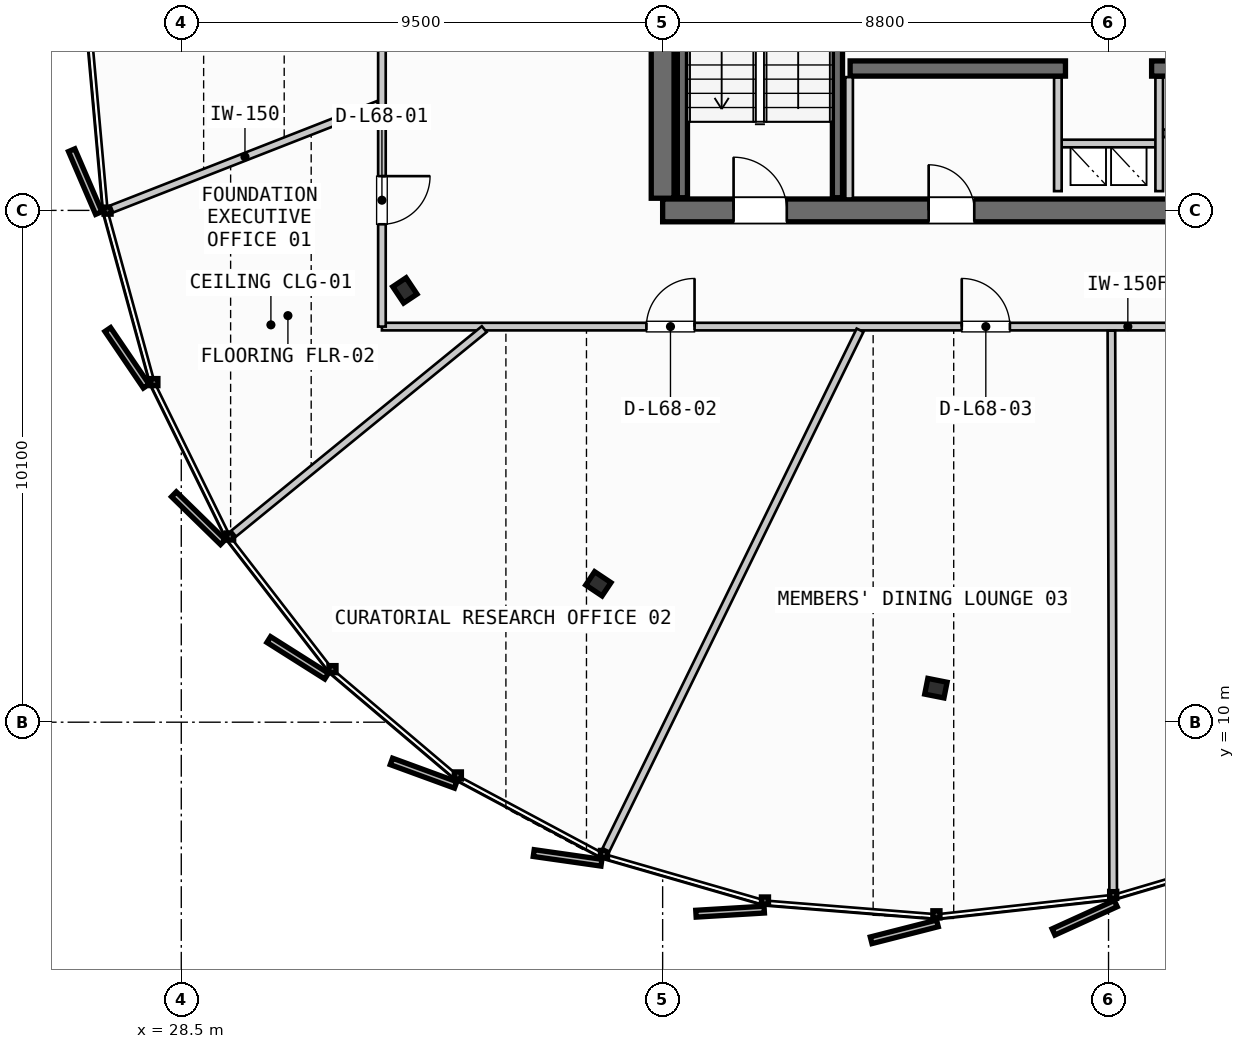
"""IFC4 building model, lengths in metres.
Left out: names, types, materials, properties, quantities, classifications, styles, units other than length and angle.
Written with IfcOpenShell. Run it as: python <this file> out.ifc"""

import sys

from ifc_helpers import new_model, si_unit, direction, frame, frame_2d, origin, origin_2d, place, context, subcontext, project, spatial, rectangle, i_section, extrude, source, transform, mapped, element, fill, save


model = new_model("IFC4")
c1 = context("Model", 3, precision=1e-05, world=origin(), true_north=direction((0.0, 1.0)))
c2 = subcontext(c1, "Body", "Model", "MODEL_VIEW")
j1 = project(units=[si_unit("LENGTHUNIT", "METRE"), si_unit("PLANEANGLEUNIT", "RADIAN")], contexts=[c1])
p1 = place(None, origin())
s1 = spatial("IfcSite", under=j1, at=p1, CompositionType="ELEMENT")
p2 = place(p1, origin())
s2 = spatial("IfcBuilding", under=s1, at=p2, CompositionType="ELEMENT")
p3 = place(p2, frame((0.0, 0.0, 259.45)))
s3 = spatial("IfcBuildingStorey", under=s2, at=p3, CompositionType="ELEMENT", Elevation=259.45)
p4 = place(p3, frame((38.0, 20.1, 0.0), z_axis=(0.0, 0.0, 1.0), x_axis=(1.0, 0.0, 0.0)))
e1 = element("IfcWall", 1, at=p4, inside=s3, PredefinedType="SHEAR", context=c2, shape_type="SweptSolid", body=[
    extrude(rectangle(XDim=17.6, YDim=0.45, at=frame_2d((8.8, 0.0))), origin(), (0.0, 0.0, 1.0), 3.21),
])
p5 = place(p4, frame((1.4, 0.0, 0.0)))
e2 = element("IfcOpeningElement", 2, at=p5, cuts=e1, PredefinedType="OPENING", context=c2, shape_type="SweptSolid", body=[
    extrude(rectangle(XDim=1.05, YDim=2.15, at=frame_2d((0.525, 1.075))), frame((0.0, 0.235, 0.0), z_axis=(0.0, -1.0, 0.0), x_axis=(1.0, 0.0, 0.0)), (0.0, 0.0, 1.0), 0.47),
])
p6 = place(p4, frame((15.15, 0.0, 0.0)))
e3 = element("IfcOpeningElement", 3, at=p6, cuts=e1, PredefinedType="OPENING", context=c2, shape_type="SweptSolid", body=[
    extrude(rectangle(XDim=1.05, YDim=2.15, at=frame_2d((0.525, 1.075))), frame((0.0, 0.235, 0.0), z_axis=(0.0, -1.0, 0.0), x_axis=(1.0, 0.0, 0.0)), (0.0, 0.0, 1.0), 0.47),
])
p7 = place(p4, frame((5.25, 0.0, 0.0)))
e4 = element("IfcOpeningElement", 4, at=p7, cuts=e1, PredefinedType="OPENING", context=c2, shape_type="SweptSolid", body=[
    extrude(rectangle(XDim=0.9, YDim=2.15, at=frame_2d((0.45, 1.075))), frame((0.0, 0.235, 0.0), z_axis=(0.0, -1.0, 0.0), x_axis=(1.0, 0.0, 0.0)), (0.0, 0.0, 1.0), 0.47),
])
p8 = place(p4, frame((11.4, 0.0, 0.0)))
e5 = element("IfcOpeningElement", 5, at=p8, cuts=e1, PredefinedType="OPENING", context=c2, shape_type="SweptSolid", body=[
    extrude(rectangle(XDim=0.95, YDim=2.15, at=frame_2d((0.475, 1.075))), frame((0.0, 0.235, 0.0), z_axis=(0.0, -1.0, 0.0), x_axis=(1.0, 0.0, 0.0)), (0.0, 0.0, 1.0), 0.47),
])
p9 = place(p3, frame((38.0, 35.26, 0.0), z_axis=(0.0, 0.0, 1.0), x_axis=(0.0, -1.0, 0.0)))
e6 = element("IfcWall", 6, at=p9, inside=s3, PredefinedType="SHEAR", context=c2, shape_type="SweptSolid", body=[
    extrude(rectangle(XDim=14.92, YDim=0.45, at=frame_2d((7.46, 0.0))), origin(), (0.0, 0.0, 1.0), 3.21),
])
p10 = place(p9, frame((5.21, 0.0, 0.0)))
e7 = element("IfcOpeningElement", 7, at=p10, cuts=e6, PredefinedType="OPENING", context=c2, shape_type="SweptSolid", body=[
    extrude(rectangle(XDim=1.1, YDim=2.2, at=frame_2d((0.55, 1.1))), frame((0.0, 0.235, 0.0), z_axis=(0.0, -1.0, 0.0), x_axis=(1.0, 0.0, 0.0)), (0.0, 0.0, 1.0), 0.47),
])
for number, where, z_axis, x_axis in (
    (8, (41.7, 22.9, 0.0), (0.0, 0.0, 1.0), (1.0, 0.0, 0.0)),
    (9, (47.65, 22.9, 0.0), (0.0, 0.0, 1.0), (1.0, 0.0, 0.0)),
):
    element("IfcWall", number, at=place(p3, frame(where, z_axis=z_axis, x_axis=x_axis)), inside=s3, PredefinedType="SHEAR", context=c2, shape_type="SweptSolid", body=[
        extrude(rectangle(XDim=4.25, YDim=0.3, at=frame_2d((2.125, 0.0))), origin(), (0.0, 0.0, 1.0), 3.21),
    ])
m1 = source(origin(), c2, "Body", "SweptSolid", [
    extrude(i_section(OverallWidth=0.387, OverallDepth=0.316, WebThickness=0.019, FlangeThickness=0.028, FilletRadius=0.015, at=origin_2d()), origin(), (0.0, 0.0, 1.0), 3.21),
])
for number, where, z_axis, x_axis in (
    (10, (32.913, 18.521, 0.0), (0.0, 0.0, 1.0), (-0.831, -0.556, 0.0)),
    (11, (36.731, 12.731, 0.0), (0.0, 0.0, 1.0), (-0.556, -0.831, 0.0)),
    (12, (43.393, 10.671, 0.0), (0.0, 0.0, 1.0), (-0.195, -0.981, 0.0)),
):
    element("IfcColumn", number, at=place(p3, frame(where, z_axis=z_axis, x_axis=x_axis)), inside=s3, PredefinedType="COLUMN", context=c2, shape_type="MappedRepresentation", body=[
        mapped(m1, transform((0.0, 0.0, 0.0), scale=1.0)),
    ])
for number, where, z_axis, x_axis in (
    (13, (41.45, 27.7, 0.0), (0.0, 0.0, 1.0), (0.0, -1.0, 0.0)),
    (14, (38.39, 20.35, 0.0), (0.0, 0.0, 1.0), (0.0, 1.0, 0.0)),
):
    element("IfcWall", number, at=place(p3, frame(where, z_axis=z_axis, x_axis=x_axis)), inside=s3, PredefinedType="SHEAR", context=c2, shape_type="SweptSolid", body=[
        extrude(rectangle(XDim=7.35, YDim=0.2, at=frame_2d((3.675, 0.0))), origin(), (0.0, 0.0, 1.0), 3.21),
    ])
p11 = place(p3, frame((45.8, 21.42, 0.0), z_axis=(0.0, 0.0, 1.0), x_axis=(1.0, 0.0, 0.0)))
e15 = element("IfcWall", 15, at=p11, inside=s3, PredefinedType="PARTITIONING", context=c2, shape_type="SweptSolid", body=[
    extrude(rectangle(XDim=2.0, YDim=0.15, at=frame_2d((1.0, 0.0))), origin(), (0.0, 0.0, 1.0), 2.735),
])
for number, where, z_axis, x_axis in (
    (16, (45.8, 20.48, 0.0), (0.0, 0.0, 1.0), (0.0, 1.0, 0.0)),
    (17, (47.8, 20.48, 0.0), (0.0, 0.0, 1.0), (0.0, 1.0, 0.0)),
):
    element("IfcWall", number, at=place(p3, frame(where, z_axis=z_axis, x_axis=x_axis)), inside=s3, PredefinedType="PARTITIONING", context=c2, shape_type="SweptSolid", body=[
        extrude(rectangle(XDim=2.24, YDim=0.15, at=frame_2d((1.12, 0.0))), origin(), (0.0, 0.0, 1.0), 2.735),
    ])
p12 = place(p3, frame((41.68, 20.335, 0.0), z_axis=(0.0, 0.0, 1.0), x_axis=(0.0, 1.0, 0.0)))
e18 = element("IfcWall", 18, at=p12, inside=s3, PredefinedType="PARTITIONING", context=c2, shape_type="SweptSolid", body=[
    extrude(rectangle(XDim=2.395, YDim=0.15, at=frame_2d((1.198, 0.0))), origin(), (0.0, 0.0, 1.0), 2.735),
])
p13 = place(p3, frame((47.88, 21.62, 0.0), z_axis=(0.0, 0.0, 1.0), x_axis=(1.0, 0.0, 0.0)))
e19 = element("IfcWall", 19, at=p13, inside=s3, PredefinedType="PARTITIONING", context=c2, shape_type="SweptSolid", body=[
    extrude(rectangle(XDim=3.96, YDim=0.15, at=frame_2d((1.98, 0.0))), origin(), (0.0, 0.0, 1.0), 2.735),
])
p14 = place(p13, frame((1.55, 0.0, 0.0)))
e20 = element("IfcOpeningElement", 20, at=p14, cuts=e19, PredefinedType="OPENING", context=c2, shape_type="SweptSolid", body=[
    extrude(rectangle(XDim=0.85, YDim=2.15, at=frame_2d((0.425, 1.075))), frame((0.0, 0.085, 0.0), z_axis=(0.0, -1.0, 0.0), x_axis=(1.0, 0.0, 0.0)), (0.0, 0.0, 1.0), 0.17),
])
p15 = place(p3, frame((32.46, 17.807, 0.0), z_axis=(0.0, 0.0, 1.0), x_axis=(1.0, 0.0, 0.0)))
e21 = element("IfcWall", 21, at=p15, inside=s3, PredefinedType="PARTITIONING", context=c2, shape_type="SweptSolid", body=[
    extrude(rectangle(XDim=29.442, YDim=0.15, at=frame_2d((14.721, 0.0))), origin(), (0.0, 0.0, 1.0), 2.735),
])
p16 = place(p15, frame((5.22, 0.0, 0.0)))
e22 = element("IfcOpeningElement", 22, at=p16, cuts=e21, PredefinedType="OPENING", context=c2, shape_type="SweptSolid", body=[
    extrude(rectangle(XDim=0.95, YDim=2.15, at=frame_2d((0.475, 1.075))), frame((0.0, 0.085, 0.0), z_axis=(0.0, -1.0, 0.0), x_axis=(1.0, 0.0, 0.0)), (0.0, 0.0, 1.0), 0.17),
])
p17 = place(p15, frame((11.443, 0.0, 0.0)))
e23 = element("IfcOpeningElement", 23, at=p17, cuts=e21, PredefinedType="OPENING", context=c2, shape_type="SweptSolid", body=[
    extrude(rectangle(XDim=0.95, YDim=2.15, at=frame_2d((0.475, 1.075))), frame((0.0, 0.085, 0.0), z_axis=(0.0, -1.0, 0.0), x_axis=(1.0, 0.0, 0.0)), (0.0, 0.0, 1.0), 0.17),
])
p18 = place(p15, frame((21.154, 0.0, 0.0)))
e24 = element("IfcOpeningElement", 24, at=p18, cuts=e21, PredefinedType="OPENING", context=c2, shape_type="SweptSolid", body=[
    extrude(rectangle(XDim=0.95, YDim=2.15, at=frame_2d((0.475, 1.075))), frame((0.0, 0.085, 0.0), z_axis=(0.0, -1.0, 0.0), x_axis=(1.0, 0.0, 0.0)), (0.0, 0.0, 1.0), 0.17),
])
p19 = place(p3, frame((32.46, 37.331, 0.0), z_axis=(0.0, 0.0, 1.0), x_axis=(0.0, -1.0, 0.0)))
e25 = element("IfcWall", 25, at=p19, inside=s3, PredefinedType="PARTITIONING", context=c2, shape_type="SweptSolid", body=[
    extrude(rectangle(XDim=19.524, YDim=0.15, at=frame_2d((9.762, 0.0))), origin(), (0.0, 0.0, 1.0), 2.735),
])
p20 = place(p19, frame((16.555, 0.0, 0.0)))
e26 = element("IfcOpeningElement", 26, at=p20, cuts=e25, PredefinedType="OPENING", context=c2, shape_type="SweptSolid", body=[
    extrude(rectangle(XDim=0.95, YDim=2.15, at=frame_2d((0.475, 1.075))), frame((0.0, 0.085, 0.0), z_axis=(0.0, -1.0, 0.0), x_axis=(1.0, 0.0, 0.0)), (0.0, 0.0, 1.0), 0.17),
])
p21 = place(p19, frame((8.942, 0.0, 0.0)))
e27 = element("IfcOpeningElement", 27, at=p21, cuts=e25, PredefinedType="OPENING", context=c2, shape_type="SweptSolid", body=[
    extrude(rectangle(XDim=0.95, YDim=2.15, at=frame_2d((0.475, 1.075))), frame((0.0, 0.085, 0.0), z_axis=(0.0, -1.0, 0.0), x_axis=(1.0, 0.0, 0.0)), (0.0, 0.0, 1.0), 0.17),
])
p22 = place(p3, frame((32.385, 22.187, 0.0), z_axis=(0.0, 0.0, 1.0), x_axis=(-0.931177682832, -0.36456566349, 0.0)))
e28 = element("IfcWall", 28, at=p22, inside=s3, PredefinedType="PARTITIONING", context=c2, shape_type="SweptSolid", body=[
    extrude(rectangle(XDim=5.645, YDim=0.15, at=frame_2d((2.823, 0.0))), origin(), (0.0, 0.0, 1.0), 2.735),
])
p23 = place(p3, frame((34.479, 17.756, 0.0), z_axis=(0.0, 0.0, 1.0), x_axis=(-0.77484776556, -0.632147878433, 0.0)))
e29 = element("IfcWall", 29, at=p23, inside=s3, PredefinedType="PARTITIONING", context=c2, shape_type="SweptSolid", body=[
    extrude(rectangle(XDim=6.383, YDim=0.15, at=frame_2d((3.192, 0.0))), origin(), (0.0, 0.0, 1.0), 2.735),
])
p24 = place(p3, frame((41.896, 17.735, 0.0), z_axis=(0.0, 0.0, 1.0), x_axis=(-0.439308331491, -0.898336345632, 0.0)))
e30 = element("IfcWall", 30, at=p24, inside=s3, PredefinedType="PARTITIONING", context=c2, shape_type="SweptSolid", body=[
    extrude(rectangle(XDim=11.415, YDim=0.15, at=frame_2d((5.708, 0.0))), origin(), (0.0, 0.0, 1.0), 2.735),
])
p25 = place(p3, frame((46.857, 17.727, 0.0), z_axis=(0.0, 0.0, 1.0), x_axis=(0.00316097362, -0.99999500411, 0.0)))
e31 = element("IfcWall", 31, at=p25, inside=s3, PredefinedType="PARTITIONING", context=c2, shape_type="SweptSolid", body=[
    extrude(rectangle(XDim=11.045, YDim=0.15, at=frame_2d((5.522, 0.0))), origin(), (0.0, 0.0, 1.0), 2.735),
])
m2 = source(origin(), c2, "Body", "SweptSolid", [
    extrude(rectangle(XDim=1.05, YDim=2.15, at=frame_2d((0.525, 1.075))), frame((0.0, 0.025, 0.0), z_axis=(0.0, -1.0, 0.0), x_axis=(1.0, 0.0, 0.0)), (0.0, 0.0, 1.0), 0.05),
])
p26 = place(p5, origin())
e32 = element("IfcDoor", 32, at=p26, inside=s3, OperationType="SINGLE_SWING_LEFT", PredefinedType="DOOR", context=c2, shape_type="MappedRepresentation", body=[
    mapped(m2, transform((0.0, 0.0, 0.0), scale=1.0)),
])
fill(e2, e32)
m3 = source(origin(), c2, "Body", "SweptSolid", [
    extrude(rectangle(XDim=0.9, YDim=2.15, at=frame_2d((0.45, 1.075))), frame((0.0, 0.025, 0.0), z_axis=(0.0, -1.0, 0.0), x_axis=(1.0, 0.0, 0.0)), (0.0, 0.0, 1.0), 0.05),
])
p27 = place(p7, origin())
e33 = element("IfcDoor", 33, at=p27, inside=s3, OperationType="SINGLE_SWING_LEFT", PredefinedType="DOOR", context=c2, shape_type="MappedRepresentation", body=[
    mapped(m3, transform((0.0, 0.0, 0.0), scale=1.0)),
])
fill(e4, e33)
m4 = source(origin(), c2, "Body", "SweptSolid", [
    extrude(rectangle(XDim=0.95, YDim=2.15, at=frame_2d((0.475, 1.075))), frame((0.0, 0.025, 0.0), z_axis=(0.0, -1.0, 0.0), x_axis=(1.0, 0.0, 0.0)), (0.0, 0.0, 1.0), 0.05),
])
p28 = place(p16, origin())
e34 = element("IfcDoor", 34, at=p28, inside=s3, OperationType="SINGLE_SWING_RIGHT", PredefinedType="DOOR", context=c2, shape_type="MappedRepresentation", body=[
    mapped(m4, transform((0.0, 0.0, 0.0), scale=1.0)),
])
fill(e22, e34)
p29 = place(p17, origin())
e35 = element("IfcDoor", 35, at=p29, inside=s3, OperationType="SINGLE_SWING_LEFT", PredefinedType="DOOR", context=c2, shape_type="MappedRepresentation", body=[
    mapped(m4, transform((0.0, 0.0, 0.0), scale=1.0)),
])
fill(e23, e35)
p30 = place(p20, origin())
e36 = element("IfcDoor", 36, at=p30, inside=s3, OperationType="SINGLE_SWING_LEFT", PredefinedType="DOOR", context=c2, shape_type="MappedRepresentation", body=[
    mapped(m4, transform((0.0, 0.0, 0.0), scale=1.0)),
])
fill(e26, e36)
save(model, sys.argv[1])
